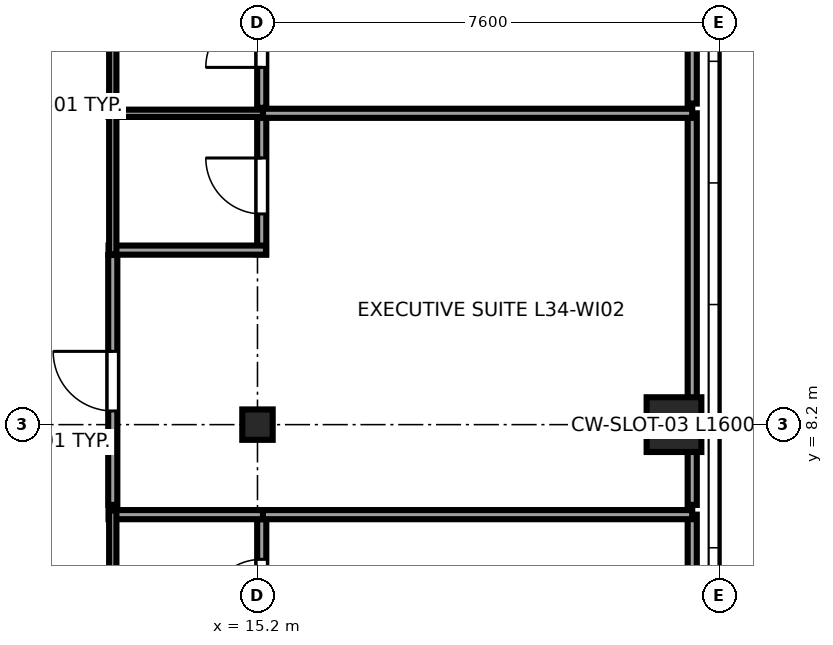
"""IFC4 building model, lengths in metres.
Left out: names, types, materials, properties, quantities, classifications, styles, units other than length and angle.
Written with IfcOpenShell. Run it as: python <this file> out.ifc"""

import sys

from ifc_helpers import new_model, si_unit, direction, frame, frame_2d, origin, origin_2d, place, context, subcontext, project, spatial, rectangle, i_section, extrude, source, transform, mapped, element, fill, save


model = new_model("IFC4")
c1 = context("Model", 3, precision=1e-05, world=origin(), true_north=direction((0.0, 1.0)))
c2 = subcontext(c1, "Body", "Model", "MODEL_VIEW")
j1 = project(units=[si_unit("LENGTHUNIT", "METRE"), si_unit("PLANEANGLEUNIT", "RADIAN")], contexts=[c1])
p1 = place(None, origin())
s1 = spatial("IfcSite", under=j1, at=p1, CompositionType="ELEMENT")
p2 = place(p1, origin())
s2 = spatial("IfcBuilding", under=s1, at=p2, CompositionType="ELEMENT")
p3 = place(p2, frame((0.0, 0.0, 132.85)))
s3 = spatial("IfcBuildingStorey", under=s2, at=p3, CompositionType="ELEMENT", Elevation=132.85)
m1 = source(origin(), c2, "Body", "SweptSolid", [
    extrude(i_section(OverallWidth=0.5, OverallDepth=0.5, WebThickness=0.022, FlangeThickness=0.034, at=origin_2d()), origin(), (0.0, 0.0, 1.0), 3.55),
])
p4 = place(p3, frame((15.2, 8.2, 0.0), z_axis=(0.0, 0.0, 1.0), x_axis=(1.0, 0.0, 0.0)))
e1 = element("IfcColumn", 1, at=p4, inside=s3, PredefinedType="COLUMN", context=c2, shape_type="MappedRepresentation", body=[
    mapped(m1, transform((0.0, 0.0, 0.0), x_axis=(1.0, 0.0, 0.0), y_axis=(0.0, 1.0, 0.0), z_axis=(0.0, 0.0, 1.0), scale=1.0)),
])
m2 = source(origin(), c2, "Body", "SweptSolid", [
    extrude(rectangle(XDim=0.9, YDim=0.9, at=origin_2d()), origin(), (0.0, 0.0, 1.0), 3.55),
])
p5 = place(p3, frame((22.05, 8.2, 0.0), z_axis=(0.0, 0.0, 1.0), x_axis=(1.0, 0.0, 0.0)))
e2 = element("IfcColumn", 2, at=p5, inside=s3, PredefinedType="COLUMN", context=c2, shape_type="MappedRepresentation", body=[
    mapped(m2, transform((0.0, 0.0, 0.0), x_axis=(1.0, 0.0, 0.0), y_axis=(0.0, 1.0, 0.0), z_axis=(0.0, 0.0, 1.0), scale=1.0)),
])
p6 = place(p3, frame((15.27, 4.4, 0.0), z_axis=(0.0, 0.0, 1.0), x_axis=(0.0, 1.0, 0.0)))
e3 = element("IfcWall", 3, at=p6, inside=s3, PredefinedType="PARTITIONING", context=c2, shape_type="SweptSolid", body=[
    extrude(rectangle(XDim=2.39, YDim=0.15, at=frame_2d((1.195, 0.0))), origin(), (0.0, 0.0, 1.0), 2.827),
])
p7 = place(p6, frame((0.665, 0.0, 0.0)))
e4 = element("IfcOpeningElement", 4, at=p7, cuts=e3, PredefinedType="OPENING", context=c2, shape_type="SweptSolid", body=[
    extrude(rectangle(XDim=0.92, YDim=2.01, at=frame_2d((0.46, 1.005))), frame((0.0, 0.085, 0.0), z_axis=(0.0, -1.0, 0.0), x_axis=(1.0, 0.0, 0.0)), (0.0, 0.0, 1.0), 0.17),
])
p8 = place(p3, frame((12.75, 6.72, 0.0), z_axis=(0.0, 0.0, 1.0), x_axis=(1.0, 0.0, 0.0)))
e5 = element("IfcWall", 5, at=p8, inside=s3, PredefinedType="PARTITIONING", context=c2, shape_type="SweptSolid", body=[
    extrude(rectangle(XDim=2.59, YDim=0.15, at=frame_2d((1.295, 0.0))), origin(), (0.0, 0.0, 1.0), 3.37),
])
p9 = place(p3, frame((12.82, 4.4, 0.0), z_axis=(0.0, 0.0, 1.0), x_axis=(0.0, 1.0, 0.0)))
e6 = element("IfcWall", 6, at=p9, inside=s3, PredefinedType="PLUMBINGWALL", context=c2, shape_type="SweptSolid", body=[
    extrude(rectangle(XDim=2.39, YDim=0.12, at=frame_2d((1.195, 0.0))), origin(), (0.0, 0.0, 1.0), 3.37),
])
p10 = place(p3, frame((15.27, 11.0, 0.0), z_axis=(0.0, 0.0, 1.0), x_axis=(0.0, 1.0, 0.0)))
e7 = element("IfcWall", 7, at=p10, inside=s3, PredefinedType="PARTITIONING", context=c2, shape_type="SweptSolid", body=[
    extrude(rectangle(XDim=2.39, YDim=0.15, at=frame_2d((1.195, 0.0))), origin(), (0.0, 0.0, 1.0), 2.827),
])
p11 = place(p10, frame((0.665, 0.0, 0.0)))
e8 = element("IfcOpeningElement", 8, at=p11, cuts=e7, PredefinedType="OPENING", context=c2, shape_type="SweptSolid", body=[
    extrude(rectangle(XDim=0.92, YDim=2.01, at=frame_2d((0.46, 1.005))), frame((0.0, 0.085, 0.0), z_axis=(0.0, -1.0, 0.0), x_axis=(1.0, 0.0, 0.0)), (0.0, 0.0, 1.0), 0.17),
])
p12 = place(p3, frame((12.75, 11.07, 0.0), z_axis=(0.0, 0.0, 1.0), x_axis=(1.0, 0.0, 0.0)))
e9 = element("IfcWall", 9, at=p12, inside=s3, PredefinedType="PARTITIONING", context=c2, shape_type="SweptSolid", body=[
    extrude(rectangle(XDim=2.59, YDim=0.15, at=frame_2d((1.295, 0.0))), origin(), (0.0, 0.0, 1.0), 3.37),
])
p13 = place(p3, frame((12.75, 13.32, 0.0), z_axis=(0.0, 0.0, 1.0), x_axis=(1.0, 0.0, 0.0)))
e10 = element("IfcWall", 10, at=p13, inside=s3, PredefinedType="PLUMBINGWALL", context=c2, shape_type="SweptSolid", body=[
    extrude(rectangle(XDim=2.59, YDim=0.12, at=frame_2d((1.295, 0.0))), origin(), (0.0, 0.0, 1.0), 3.37),
])
p14 = place(p3, frame((12.82, 11.0, 0.0), z_axis=(0.0, 0.0, 1.0), x_axis=(0.0, 1.0, 0.0)))
e11 = element("IfcWall", 11, at=p14, inside=s3, PredefinedType="PLUMBINGWALL", context=c2, shape_type="SweptSolid", body=[
    extrude(rectangle(XDim=2.39, YDim=0.12, at=frame_2d((1.195, 0.0))), origin(), (0.0, 0.0, 1.0), 3.37),
])
p15 = place(p3, frame((15.27, 13.41, 0.0), z_axis=(0.0, 0.0, 1.0), x_axis=(0.0, 1.0, 0.0)))
e12 = element("IfcWall", 12, at=p15, inside=s3, PredefinedType="PARTITIONING", context=c2, shape_type="SweptSolid", body=[
    extrude(rectangle(XDim=2.39, YDim=0.15, at=frame_2d((1.195, 0.0))), origin(), (0.0, 0.0, 1.0), 2.827),
])
p16 = place(p15, frame((0.665, 0.0, 0.0)))
e13 = element("IfcOpeningElement", 13, at=p16, cuts=e12, PredefinedType="OPENING", context=c2, shape_type="SweptSolid", body=[
    extrude(rectangle(XDim=0.92, YDim=2.01, at=frame_2d((0.46, 1.005))), frame((0.0, 0.085, 0.0), z_axis=(0.0, -1.0, 0.0), x_axis=(1.0, 0.0, 0.0)), (0.0, 0.0, 1.0), 0.17),
])
p17 = place(p3, frame((12.82, 13.41, 0.0), z_axis=(0.0, 0.0, 1.0), x_axis=(0.0, 1.0, 0.0)))
e14 = element("IfcWall", 14, at=p17, inside=s3, PredefinedType="PLUMBINGWALL", context=c2, shape_type="SweptSolid", body=[
    extrude(rectangle(XDim=2.39, YDim=0.12, at=frame_2d((1.195, 0.0))), origin(), (0.0, 0.0, 1.0), 3.37),
])
p18 = place(p3, frame((22.35, 0.405, 0.0), z_axis=(0.0, 0.0, 1.0), x_axis=(0.0, 1.0, 0.0)))
e15 = element("IfcWall", 15, at=p18, inside=s3, PredefinedType="PARTITIONING", context=c2, shape_type="SweptSolid", body=[
    extrude(rectangle(XDim=6.315, YDim=0.15, at=frame_2d((3.157, 0.0))), origin(), (0.0, 0.0, 1.0), 3.37),
])
p19 = place(p3, frame((15.29, 6.72, 0.0), z_axis=(0.0, 0.0, 1.0), x_axis=(1.0, 0.0, 0.0)))
e16 = element("IfcWall", 16, at=p19, inside=s3, PredefinedType="PARTITIONING", context=c2, shape_type="SweptSolid", body=[
    extrude(rectangle(XDim=7.06, YDim=0.15, at=frame_2d((3.53, 0.0))), origin(), (0.0, 0.0, 1.0), 3.37),
])
p20 = place(p3, frame((12.82, 6.88, 0.0), z_axis=(0.0, 0.0, 1.0), x_axis=(0.0, 1.0, 0.0)))
e17 = element("IfcWall", 17, at=p20, inside=s3, PredefinedType="PARTITIONING", context=c2, shape_type="SweptSolid", body=[
    extrude(rectangle(XDim=4.11, YDim=0.15, at=frame_2d((2.055, 0.0))), origin(), (0.0, 0.0, 1.0), 3.37),
])
p21 = place(p20, frame((1.545, 0.0, 0.0)))
e18 = element("IfcOpeningElement", 18, at=p21, cuts=e17, PredefinedType="OPENING", context=c2, shape_type="SweptSolid", body=[
    extrude(rectangle(XDim=0.98, YDim=2.12, at=frame_2d((0.49, 1.06))), frame((0.0, 0.085, 0.0), z_axis=(0.0, -1.0, 0.0), x_axis=(1.0, 0.0, 0.0)), (0.0, 0.0, 1.0), 0.17),
])
p22 = place(p3, frame((22.35, 6.88, 0.0), z_axis=(0.0, 0.0, 1.0), x_axis=(0.0, 1.0, 0.0)))
e19 = element("IfcWall", 19, at=p22, inside=s3, PredefinedType="PARTITIONING", context=c2, shape_type="SweptSolid", body=[
    extrude(rectangle(XDim=6.44, YDim=0.15, at=frame_2d((3.22, 0.0))), origin(), (0.0, 0.0, 1.0), 3.37),
])
p23 = place(p3, frame((15.29, 13.32, 0.0), z_axis=(0.0, 0.0, 1.0), x_axis=(1.0, 0.0, 0.0)))
e20 = element("IfcWall", 20, at=p23, inside=s3, PredefinedType="PARTITIONING", context=c2, shape_type="SweptSolid", body=[
    extrude(rectangle(XDim=7.06, YDim=0.15, at=frame_2d((3.53, 0.0))), origin(), (0.0, 0.0, 1.0), 3.37),
])
p24 = place(p3, frame((22.35, 13.48, 0.0), z_axis=(0.0, 0.0, 1.0), x_axis=(0.0, 1.0, 0.0)))
e21 = element("IfcWall", 21, at=p24, inside=s3, PredefinedType="PARTITIONING", context=c2, shape_type="SweptSolid", body=[
    extrude(rectangle(XDim=6.54, YDim=0.15, at=frame_2d((3.27, 0.0))), origin(), (0.0, 0.0, 1.0), 3.37),
])
m3 = source(origin(), c2, "Body", "SweptSolid", [
    extrude(rectangle(XDim=0.92, YDim=2.01, at=frame_2d((0.46, 1.005))), frame((0.0, 0.025, 0.0), z_axis=(0.0, -1.0, 0.0), x_axis=(1.0, 0.0, 0.0)), (0.0, 0.0, 1.0), 0.05),
])
p25 = place(p7, origin())
e22 = element("IfcDoor", 22, at=p25, inside=s3, OperationType="SINGLE_SWING_LEFT", PredefinedType="DOOR", context=c2, shape_type="MappedRepresentation", body=[
    mapped(m3, transform((0.0, 0.0, 0.0), x_axis=(1.0, 0.0, 0.0), y_axis=(0.0, 1.0, 0.0), z_axis=(0.0, 0.0, 1.0), scale=1.0)),
])
fill(e4, e22)
p26 = place(p11, origin())
e23 = element("IfcDoor", 23, at=p26, inside=s3, OperationType="SINGLE_SWING_RIGHT", PredefinedType="DOOR", context=c2, shape_type="MappedRepresentation", body=[
    mapped(m3, transform((0.0, 0.0, 0.0), x_axis=(1.0, 0.0, 0.0), y_axis=(0.0, 1.0, 0.0), z_axis=(0.0, 0.0, 1.0), scale=1.0)),
])
fill(e8, e23)
p27 = place(p16, origin())
e24 = element("IfcDoor", 24, at=p27, inside=s3, OperationType="SINGLE_SWING_LEFT", PredefinedType="DOOR", context=c2, shape_type="MappedRepresentation", body=[
    mapped(m3, transform((0.0, 0.0, 0.0), x_axis=(1.0, 0.0, 0.0), y_axis=(0.0, 1.0, 0.0), z_axis=(0.0, 0.0, 1.0), scale=1.0)),
])
fill(e13, e24)
m4 = source(origin(), c2, "Body", "SweptSolid", [
    extrude(rectangle(XDim=0.98, YDim=2.12, at=frame_2d((0.49, 1.06))), frame((0.0, 0.025, 0.0), z_axis=(0.0, -1.0, 0.0), x_axis=(1.0, 0.0, 0.0)), (0.0, 0.0, 1.0), 0.05),
])
p28 = place(p21, origin())
e25 = element("IfcDoor", 25, at=p28, inside=s3, OperationType="SINGLE_SWING_RIGHT", PredefinedType="DOOR", context=c2, shape_type="MappedRepresentation", body=[
    mapped(m4, transform((0.0, 0.0, 0.0), x_axis=(1.0, 0.0, 0.0), y_axis=(0.0, 1.0, 0.0), z_axis=(0.0, 0.0, 1.0), scale=1.0)),
])
fill(e18, e25)
save(model, sys.argv[1])
